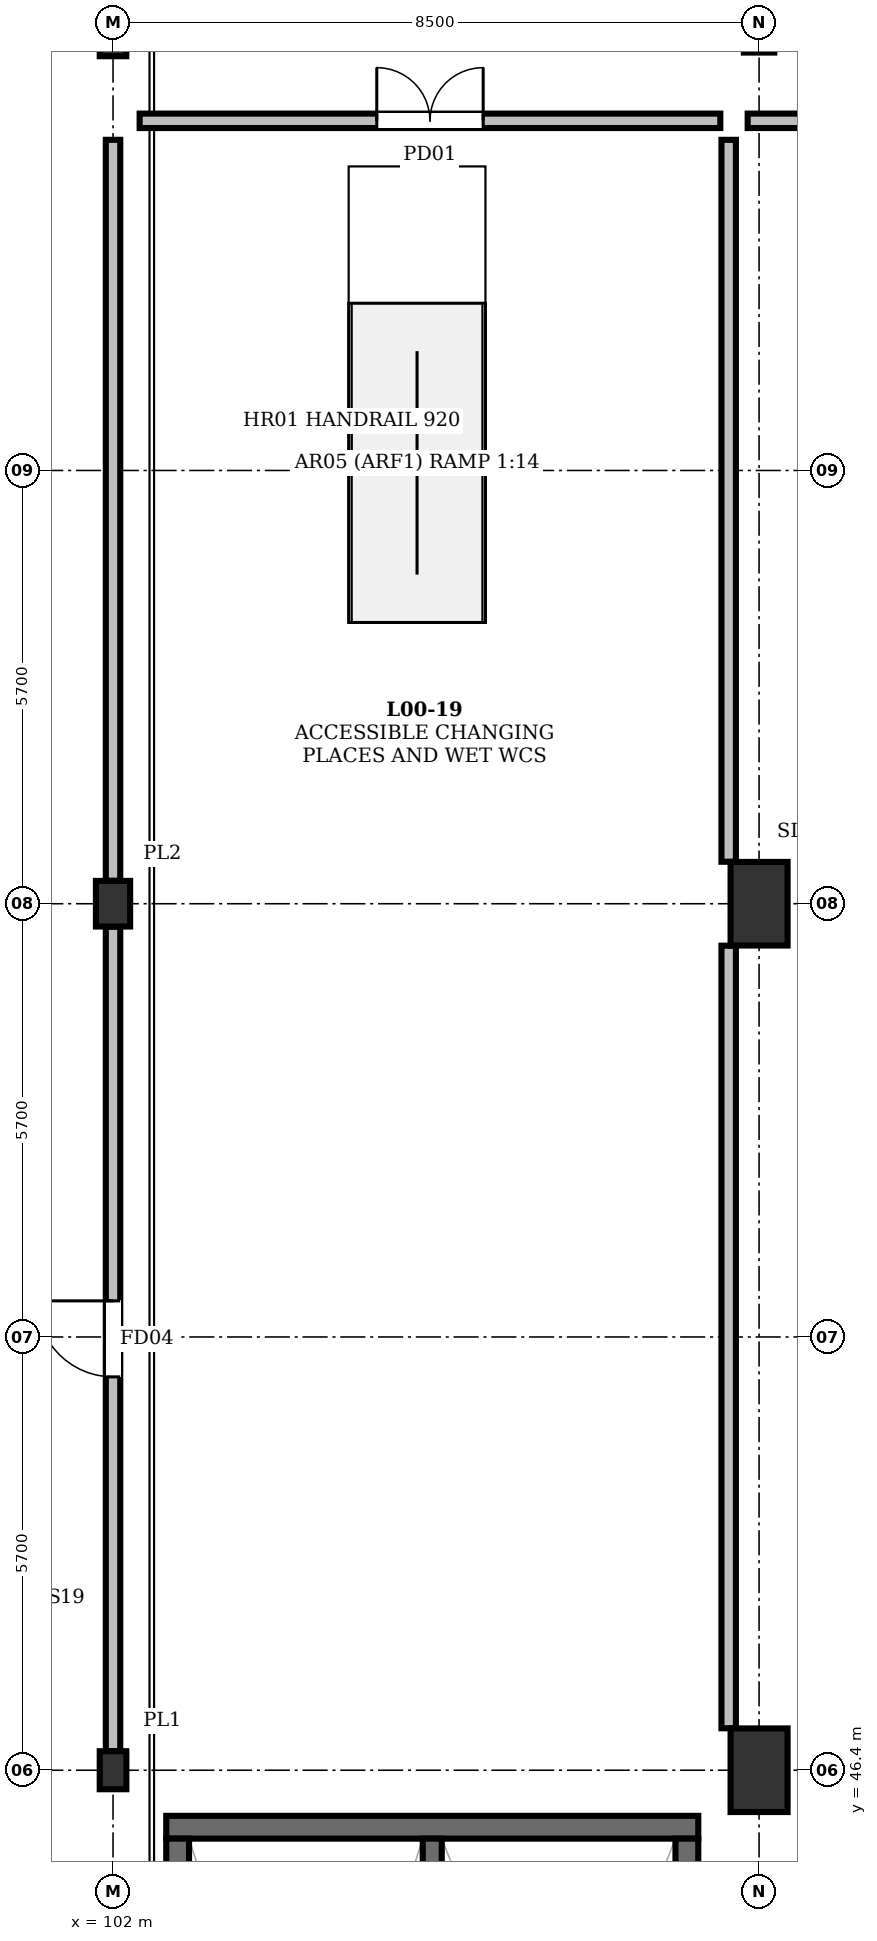
"""IFC4 building model, lengths in metres.
Left out: names, types, materials, properties, quantities, classifications, styles, units other than length and angle.
Written with IfcOpenShell. Run it as: python <this file> out.ifc"""

import sys

from ifc_helpers import new_model, si_unit, direction, frame, frame_2d, origin, origin_2d, place, context, subcontext, project, spatial, rectangle, i_section, extrude, element, fill, save


model = new_model("IFC4")
c1 = context("Model", 3, precision=1e-05, world=origin(), true_north=direction((0.0, 1.0)))
c2 = subcontext(c1, "Body", "Model", "MODEL_VIEW")
j1 = project(units=[si_unit("LENGTHUNIT", "METRE"), si_unit("PLANEANGLEUNIT", "RADIAN")], contexts=[c1])
p1 = place(None, origin())
s1 = spatial("IfcSite", under=j1, at=p1, CompositionType="ELEMENT")
p2 = place(p1, origin())
s2 = spatial("IfcBuilding", under=s1, at=p2, CompositionType="ELEMENT")
p3 = place(p2, origin())
s3 = spatial("IfcBuildingStorey", under=s2, at=p3, CompositionType="ELEMENT", Elevation=0.0)
p4 = place(p3, frame((102.0, 46.4, 0.0), z_axis=(0.0, 0.0, 1.0), x_axis=(1.0, 0.0, 0.0)))
e1 = element("IfcColumn", 1, at=p4, inside=s3, PredefinedType="PILASTER", context=c2, shape_type="SweptSolid", body=[
    extrude(rectangle(XDim=0.35, YDim=0.5, at=origin_2d()), origin(), (0.0, 0.0, 1.0), 5.4),
])
p5 = place(p3, frame((102.0, 57.8, 0.0), z_axis=(0.0, 0.0, 1.0), x_axis=(1.0, 0.0, 0.0)))
e2 = element("IfcColumn", 2, at=p5, inside=s3, PredefinedType="PILASTER", context=c2, shape_type="SweptSolid", body=[
    extrude(rectangle(XDim=0.45, YDim=0.6, at=origin_2d()), origin(), (0.0, 0.0, 1.0), 5.4),
])
p6 = place(p3, frame((102.0, 69.2, 0.0), z_axis=(0.0, 0.0, 1.0), x_axis=(1.0, 0.0, 0.0)))
e3 = element("IfcColumn", 3, at=p6, inside=s3, PredefinedType="PILASTER", context=c2, shape_type="SweptSolid", body=[
    extrude(rectangle(XDim=0.35, YDim=0.5, at=origin_2d()), origin(), (0.0, 0.0, 1.0), 5.4),
])
for number, where, z_axis, x_axis in (
    (4, (110.5, 46.4, 0.0), (0.0, 0.0, 1.0), (1.0, 0.0, 0.0)),
    (5, (110.5, 57.8, 0.0), (0.0, 0.0, 1.0), (1.0, 0.0, 0.0)),
):
    element("IfcColumn", number, at=place(p3, frame(where, z_axis=z_axis, x_axis=x_axis)), inside=s3, PredefinedType="COLUMN", context=c2, shape_type="SweptSolid", body=[
        extrude(rectangle(XDim=0.75, YDim=1.1, at=origin_2d()), origin(), (0.0, 0.0, 1.0), 5.4),
    ])
p7 = place(p3, frame((110.5, 69.2, 0.0), z_axis=(0.0, 0.0, 1.0), x_axis=(1.0, 0.0, 0.0)))
e6 = element("IfcColumn", 6, at=p7, inside=s3, PredefinedType="COLUMN", context=c2, shape_type="SweptSolid", body=[
    extrude(i_section(OverallWidth=0.4, OverallDepth=0.404, WebThickness=0.02, FlangeThickness=0.032, at=origin_2d()), origin(), (0.0, 0.0, 1.0), 5.4),
])
p8 = place(p3, frame((102.7, 45.65, 0.0), z_axis=(0.0, 0.0, 1.0), x_axis=(1.0, 0.0, 0.0)))
e7 = element("IfcWall", 7, at=p8, inside=s3, PredefinedType="SHEAR", context=c2, shape_type="SweptSolid", body=[
    extrude(rectangle(XDim=7.0, YDim=0.3, at=frame_2d((3.5, 0.0))), origin(), (0.0, 0.0, 1.0), 5.16),
])
p9 = place(p3, frame((102.85, 35.9, 0.0), z_axis=(0.0, 0.0, 1.0), x_axis=(0.0, 1.0, 0.0)))
e8 = element("IfcWall", 8, at=p9, inside=s3, PredefinedType="SHEAR", context=c2, shape_type="SweptSolid", body=[
    extrude(rectangle(XDim=9.6, YDim=0.3, at=frame_2d((4.8, 0.0))), origin(), (0.0, 0.0, 1.0), 5.16),
])
p10 = place(p9, frame((3.6, 0.0, 0.0)))
e9 = element("IfcOpeningElement", 9, at=p10, cuts=e8, PredefinedType="OPENING", context=c2, shape_type="SweptSolid", body=[
    extrude(rectangle(XDim=1.1, YDim=2.2, at=frame_2d((0.55, 1.1))), frame((0.0, 0.162, 0.0), z_axis=(0.0, -1.0, 0.0), x_axis=(1.0, 0.0, 0.0)), (0.0, 0.0, 1.0), 0.324),
])
p11 = place(p3, frame((109.55, 35.9, 0.0), z_axis=(0.0, 0.0, 1.0), x_axis=(0.0, 1.0, 0.0)))
e10 = element("IfcWall", 10, at=p11, inside=s3, PredefinedType="SHEAR", context=c2, shape_type="SweptSolid", body=[
    extrude(rectangle(XDim=9.6, YDim=0.3, at=frame_2d((4.8, 0.0))), origin(), (0.0, 0.0, 1.0), 5.16),
])
p12 = place(p11, frame((0.2, 0.0, 0.0)))
e11 = element("IfcOpeningElement", 11, at=p12, cuts=e10, PredefinedType="OPENING", context=c2, shape_type="SweptSolid", body=[
    extrude(rectangle(XDim=1.6, YDim=2.2, at=frame_2d((0.8, 1.1))), frame((0.0, 0.162, 0.0), z_axis=(0.0, -1.0, 0.0), x_axis=(1.0, 0.0, 0.0)), (0.0, 0.0, 1.0), 0.324),
])
p13 = place(p3, frame((106.2, 35.9, 0.0), z_axis=(0.0, 0.0, 1.0), x_axis=(0.0, 1.0, 0.0)))
e12 = element("IfcWall", 12, at=p13, inside=s3, PredefinedType="SHEAR", context=c2, shape_type="SweptSolid", body=[
    extrude(rectangle(XDim=9.6, YDim=0.25, at=frame_2d((4.8, 0.0))), origin(), (0.0, 0.0, 1.0), 5.16),
])
p14 = place(p3, frame((102.0, 46.652, 0.0), z_axis=(0.0, 0.0, 1.0), x_axis=(0.0, 1.0, 0.0)))
e13 = element("IfcWall", 13, at=p14, inside=s3, PredefinedType="SOLIDWALL", context=c2, shape_type="SweptSolid", body=[
    extrude(rectangle(XDim=10.846, YDim=0.19, at=frame_2d((5.423, 0.0))), origin(), (0.0, 0.0, 1.0), 4.245),
])
p15 = place(p14, frame((4.923, 0.0, 0.0)))
e14 = element("IfcOpeningElement", 14, at=p15, cuts=e13, PredefinedType="OPENING", context=c2, shape_type="SweptSolid", body=[
    extrude(rectangle(XDim=1.0, YDim=2.2, at=frame_2d((0.5, 1.1))), frame((0.0, 0.107, 0.0), z_axis=(0.0, -1.0, 0.0), x_axis=(1.0, 0.0, 0.0)), (0.0, 0.0, 1.0), 0.214),
])
p16 = place(p3, frame((102.0, 58.102, 0.0), z_axis=(0.0, 0.0, 1.0), x_axis=(0.0, 1.0, 0.0)))
e15 = element("IfcWall", 15, at=p16, inside=s3, PredefinedType="SOLIDWALL", context=c2, shape_type="SweptSolid", body=[
    extrude(rectangle(XDim=9.748, YDim=0.19, at=frame_2d((4.874, 0.0))), origin(), (0.0, 0.0, 1.0), 4.245),
])
p17 = place(p3, frame((110.1, 46.952, 0.0), z_axis=(0.0, 0.0, 1.0), x_axis=(0.0, 1.0, 0.0)))
e16 = element("IfcWall", 16, at=p17, inside=s3, PredefinedType="SOLIDWALL", context=c2, shape_type="SweptSolid", body=[
    extrude(rectangle(XDim=10.296, YDim=0.19, at=frame_2d((5.148, 0.0))), origin(), (0.0, 0.0, 1.0), 4.445),
])
p18 = place(p3, frame((110.1, 58.352, 0.0), z_axis=(0.0, 0.0, 1.0), x_axis=(0.0, 1.0, 0.0)))
e17 = element("IfcWall", 17, at=p18, inside=s3, PredefinedType="SOLIDWALL", context=c2, shape_type="SweptSolid", body=[
    extrude(rectangle(XDim=9.498, YDim=0.19, at=frame_2d((4.749, 0.0))), origin(), (0.0, 0.0, 1.0), 4.445),
])
p19 = place(p3, frame((110.35, 68.1, 0.0), z_axis=(0.0, 0.0, 1.0), x_axis=(1.0, 0.0, 0.0)))
e18 = element("IfcWall", 18, at=p19, inside=s3, PredefinedType="SOLIDWALL", context=c2, shape_type="SweptSolid", body=[
    extrude(rectangle(XDim=17.1, YDim=0.19, at=frame_2d((8.55, 0.0))), origin(), (0.0, 0.0, 1.0), 3.645),
])
p20 = place(p19, frame((5.525, 0.0, 0.0)))
e19 = element("IfcOpeningElement", 19, at=p20, cuts=e18, PredefinedType="OPENING", context=c2, shape_type="SweptSolid", body=[
    extrude(rectangle(XDim=0.92, YDim=2.15, at=frame_2d((0.46, 1.075))), frame((0.0, 0.107, 0.0), z_axis=(0.0, -1.0, 0.0), x_axis=(1.0, 0.0, 0.0)), (0.0, 0.0, 1.0), 0.214),
])
p21 = place(p3, frame((102.35, 68.1, 0.0), z_axis=(0.0, 0.0, 1.0), x_axis=(1.0, 0.0, 0.0)))
e20 = element("IfcWall", 20, at=p21, inside=s3, PredefinedType="SOLIDWALL", context=c2, shape_type="SweptSolid", body=[
    extrude(rectangle(XDim=7.64, YDim=0.19, at=frame_2d((3.82, 0.0))), origin(), (0.0, 0.0, 1.0), 4.612),
])
p22 = place(p21, frame((3.12, 0.0, 0.0)))
e21 = element("IfcOpeningElement", 21, at=p22, cuts=e20, PredefinedType="OPENING", context=c2, shape_type="SweptSolid", body=[
    extrude(rectangle(XDim=1.4, YDim=2.2, at=frame_2d((0.7, 1.1))), frame((0.0, 0.107, 0.0), z_axis=(0.0, -1.0, 0.0), x_axis=(1.0, 0.0, 0.0)), (0.0, 0.0, 1.0), 0.214),
])
p23 = place(p15, origin())
e22 = element("IfcDoor", 22, at=p23, inside=s3, OperationType="SINGLE_SWING_RIGHT", PredefinedType="DOOR", context=c2, shape_type="SweptSolid", body=[
    extrude(rectangle(XDim=1.0, YDim=2.2, at=frame_2d((0.5, 1.1))), frame((0.0, 0.025, 0.0), z_axis=(0.0, -1.0, 0.0), x_axis=(1.0, 0.0, 0.0)), (0.0, 0.0, 1.0), 0.05),
])
fill(e14, e22)
p24 = place(p22, origin())
e23 = element("IfcDoor", 23, at=p24, inside=s3, OperationType="DOUBLE_DOOR_SINGLE_SWING", PredefinedType="DOOR", context=c2, shape_type="SweptSolid", body=[
    extrude(rectangle(XDim=1.4, YDim=2.2, at=frame_2d((0.7, 1.1))), frame((0.0, 0.025, 0.0), z_axis=(0.0, -1.0, 0.0), x_axis=(1.0, 0.0, 0.0)), (0.0, 0.0, 1.0), 0.05),
])
fill(e21, e23)
save(model, sys.argv[1])
